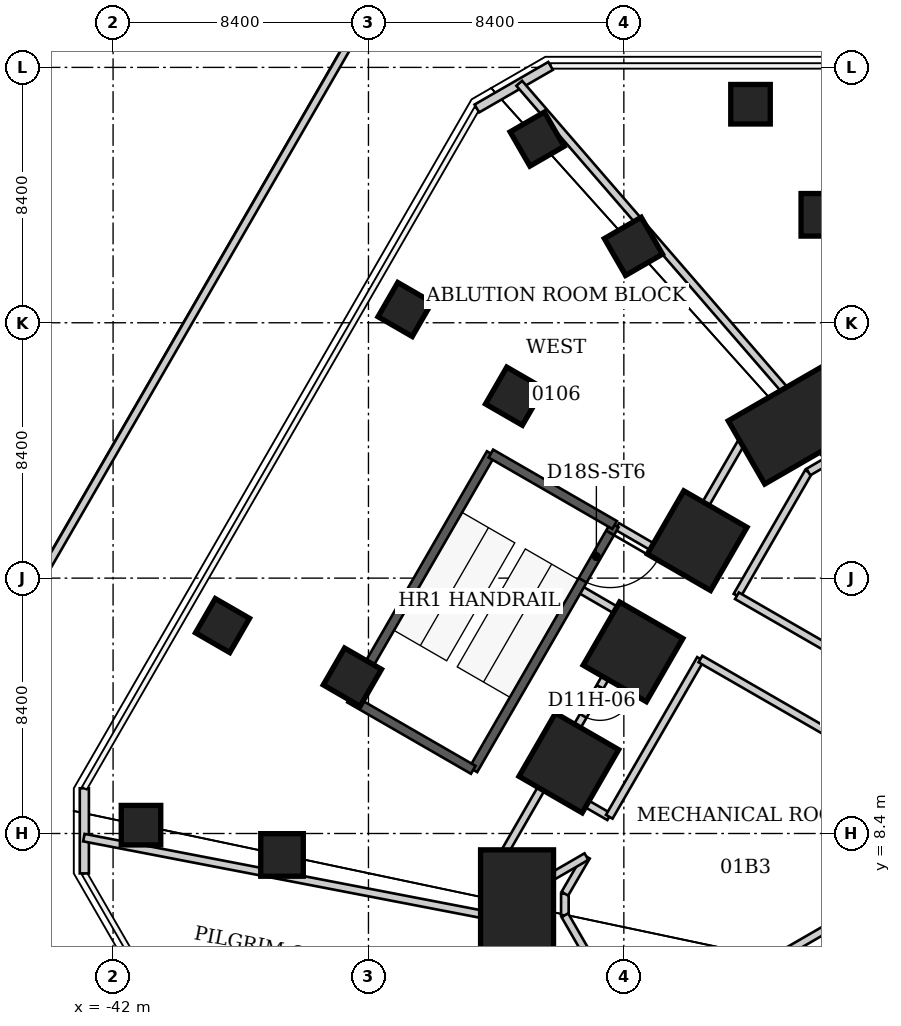
"""IFC4 building model, lengths in metres.
Left out: names, types, materials, properties, quantities, classifications, styles, units other than length and angle.
Written with IfcOpenShell. Run it as: python <this file> out.ifc"""

import sys

from ifc_helpers import new_model, si_unit, direction, frame, frame_2d, origin, origin_2d, place, context, subcontext, project, spatial, rectangle, extrude, element, fill, save


model = new_model("IFC4")
c1 = context("Model", 3, precision=1e-05, world=origin(), true_north=direction((0.0, 1.0)))
c2 = subcontext(c1, "Body", "Model", "MODEL_VIEW")
j1 = project(units=[si_unit("LENGTHUNIT", "METRE"), si_unit("PLANEANGLEUNIT", "RADIAN")], contexts=[c1])
p1 = place(None, origin())
s1 = spatial("IfcSite", under=j1, at=p1, CompositionType="ELEMENT")
p2 = place(p1, origin())
s2 = spatial("IfcBuilding", under=s1, at=p2, CompositionType="ELEMENT")
p3 = place(p2, frame((0.0, 0.0, 6.0)))
s3 = spatial("IfcBuildingStorey", under=s2, at=p3, CompositionType="ELEMENT", Elevation=6.0)
p4 = place(p3, frame((-28.713, 6.062, 0.0), z_axis=(0.0, 0.0, 1.0), x_axis=(-1.0, 0.0, 0.0)))
e1 = element("IfcColumn", 1, at=p4, inside=s3, PredefinedType="COLUMN", context=c2, shape_type="SweptSolid", body=[
    extrude(rectangle(XDim=2.4, YDim=3.6, at=origin_2d()), origin(), (0.0, 0.0, 1.0), 6.0),
])
for number, where, z_axis, x_axis in (
    (2, (-27.01, 10.719, 0.0), (0.0, 0.0, 1.0), (-0.866, 0.5, 0.0)),
    (3, (-24.899, 14.375, 0.0), (0.0, 0.0, 1.0), (-0.866, 0.5, 0.0)),
    (4, (-22.788, 18.032, 0.0), (0.0, 0.0, 1.0), (-0.866, 0.5, 0.0)),
):
    element("IfcColumn", number, at=place(p3, frame(where, z_axis=z_axis, x_axis=x_axis)), inside=s3, PredefinedType="COLUMN", context=c2, shape_type="SweptSolid", body=[
        extrude(rectangle(XDim=2.4, YDim=2.4, at=origin_2d()), origin(), (0.0, 0.0, 1.0), 6.0),
    ])
p5 = place(p3, frame((-19.606, 21.835, 0.0), z_axis=(0.0, 0.0, 1.0), x_axis=(-0.5, 0.866025403784, 0.0)))
e5 = element("IfcColumn", 5, at=p5, inside=s3, PredefinedType="COLUMN", context=c2, shape_type="SweptSolid", body=[
    extrude(rectangle(XDim=2.4, YDim=3.6, at=origin_2d()), origin(), (0.0, 0.0, 1.0), 6.0),
])
for number, where, z_axis, x_axis in (
    (6, (-18.672, 28.751, 0.0), (0.0, 0.0, 1.0), (0.0, 1.0, 0.0)),
    (7, (-36.443, 7.694, 0.0), (0.0, 0.0, 1.0), (-1.0, 0.0, 0.0)),
    (8, (-34.129, 13.544, 0.0), (0.0, 0.0, 1.0), (-0.866, 0.5, 0.0)),
    (9, (-28.794, 22.785, 0.0), (0.0, 0.0, 1.0), (-0.866, 0.5, 0.0)),
    (10, (-24.885, 27.714, 0.0), (0.0, 0.0, 1.0), (-0.5, 0.866, 0.0)),
):
    element("IfcColumn", number, at=place(p3, frame(where, z_axis=z_axis, x_axis=x_axis)), inside=s3, PredefinedType="COLUMN", context=c2, shape_type="SweptSolid", body=[
        extrude(rectangle(XDim=1.4, YDim=1.4, at=origin_2d()), origin(), (0.0, 0.0, 1.0), 6.0),
    ])
for number, where, z_axis, x_axis in (
    (11, (-21.034, 32.388, 0.0), (0.0, 0.0, 1.0), (0.0, 1.0, 0.0)),
    (12, (-41.082, 8.674, 0.0), (0.0, 0.0, 1.0), (-1.0, 0.0, 0.0)),
    (13, (-38.4, 15.239, 0.0), (0.0, 0.0, 1.0), (-0.866, 0.5, 0.0)),
    (14, (-32.397, 25.636, 0.0), (0.0, 0.0, 1.0), (-0.866, 0.5, 0.0)),
    (15, (-28.052, 31.241, 0.0), (0.0, 0.0, 1.0), (-0.5, 0.866, 0.0)),
):
    element("IfcColumn", number, at=place(p3, frame(where, z_axis=z_axis, x_axis=x_axis)), inside=s3, PredefinedType="COLUMN", context=c2, shape_type="SweptSolid", body=[
        extrude(rectangle(XDim=1.3, YDim=1.3, at=origin_2d()), origin(), (0.0, 0.0, 1.0), 6.0),
    ])
p6 = place(p3, frame((-42.945, 7.087, 0.0), z_axis=(0.0, 0.0, 1.0), x_axis=(0.0, 1.0, 0.0)))
e16 = element("IfcWall", 16, at=p6, inside=s3, PredefinedType="SOLIDWALL", context=c2, shape_type="SweptSolid", body=[
    extrude(rectangle(XDim=2.8, YDim=0.3, at=frame_2d((1.4, 0.0))), origin(), (0.0, 0.0, 1.0), 5.84),
])
p7 = place(p3, frame((-30.035, 32.248, 0.0), z_axis=(0.0, 0.0, 1.0), x_axis=(0.866056369097, 0.49994636267, 0.0)))
e17 = element("IfcWall", 17, at=p7, inside=s3, PredefinedType="SOLIDWALL", context=c2, shape_type="SweptSolid", body=[
    extrude(rectangle(XDim=2.8, YDim=0.3, at=frame_2d((1.4, 0.0))), origin(), (0.0, 0.0, 1.0), 5.84),
])
p8 = place(p3, frame((-33.343, 35.926, 0.0), z_axis=(0.0, 0.0, 1.0), x_axis=(-0.500005626994, -0.866022155013, 0.0)))
e18 = element("IfcWall", 18, at=p8, inside=s3, PredefinedType="PARAPET", context=c2, shape_type="SweptSolid", body=[
    extrude(rectangle(XDim=28.882, YDim=0.25, at=frame_2d((14.441, 0.0))), origin(), (0.0, 0.0, 1.0), 1.1),
])
p9 = place(p3, frame((-47.782, 7.822, 0.0), z_axis=(0.0, 0.0, 1.0), x_axis=(0.499999154746, -0.866025891791, 0.0)))
e19 = element("IfcWall", 19, at=p9, inside=s3, PredefinedType="PARAPET", context=c2, shape_type="SweptSolid", body=[
    extrude(rectangle(XDim=61.33, YDim=0.25, at=frame_2d((30.665, 0.0))), origin(), (0.0, 0.0, 1.0), 1.1),
])
p10 = place(p3, frame((-29.54, 5.06, 0.0), z_axis=(0.0, 0.0, 1.0), x_axis=(0.499846097802, -0.866114241029, 0.0)))
e20 = element("IfcWall", 20, at=p10, inside=s3, PredefinedType="PARTITIONING", context=c2, shape_type="SweptSolid", body=[
    extrude(rectangle(XDim=5.242, YDim=0.25, at=frame_2d((2.621, 0.0))), origin(), (0.0, 0.0, 1.0), 4.04),
])
p11 = place(p10, frame((1.971, 0.0, 0.0)))
e21 = element("IfcOpeningElement", 21, at=p11, cuts=e20, PredefinedType="OPENING", context=c2, shape_type="SweptSolid", body=[
    extrude(rectangle(XDim=1.1, YDim=2.2, at=frame_2d((0.55, 1.1))), frame((0.0, 0.125, 0.0), z_axis=(0.0, -1.0, 0.0), x_axis=(1.0, 0.0, 0.0)), (0.0, 0.0, 1.0), 0.25),
])
p12 = place(p3, frame((-29.54, 5.645, 0.0), z_axis=(0.0, 0.0, 1.0), x_axis=(0.0, -1.0, 0.0)))
e22 = element("IfcWall", 22, at=p12, inside=s3, PredefinedType="PARTITIONING", context=c2, shape_type="SweptSolid", body=[
    extrude(rectangle(XDim=0.585, YDim=0.25, at=frame_2d((0.292, 0.0))), origin(), (0.0, 0.0, 1.0), 5.84),
])
p13 = place(p3, frame((-29.54, 5.68, 0.0), z_axis=(0.0, 0.0, 1.0), x_axis=(-0.981957231685, 0.189103133611, 0.0)))
e23 = element("IfcWall", 23, at=p13, inside=s3, PredefinedType="PARTITIONING", context=c2, shape_type="SweptSolid", body=[
    extrude(rectangle(XDim=13.667, YDim=0.25, at=frame_2d((6.833, 0.0))), origin(), (0.0, 0.0, 1.0), 5.75),
])
p14 = place(p3, frame((-29.54, 7.06, 0.0), z_axis=(0.0, 0.0, 1.0), x_axis=(0.0, -1.0, 0.0)))
e24 = element("IfcWall", 24, at=p14, inside=s3, PredefinedType="PARTITIONING", context=c2, shape_type="SweptSolid", body=[
    extrude(rectangle(XDim=1.22, YDim=0.25, at=frame_2d((0.61, 0.0))), origin(), (0.0, 0.0, 1.0), 5.84),
])
p15 = place(p3, frame((-27.76, 10.15, 0.0), z_axis=(0.0, 0.0, 1.0), x_axis=(-0.499181015942, -0.8664977284, 0.0)))
e25 = element("IfcWall", 25, at=p15, inside=s3, PredefinedType="PARTITIONING", context=c2, shape_type="SweptSolid", body=[
    extrude(rectangle(XDim=3.566, YDim=0.25, at=frame_2d((1.783, 0.0))), origin(), (0.0, 0.0, 1.0), 5.84),
])
p16 = place(p3, frame((-27.76, 10.15, 0.0), z_axis=(0.0, 0.0, 1.0), x_axis=(0.866202511239, -0.499693115345, 0.0)))
e26 = element("IfcWall", 26, at=p16, inside=s3, PredefinedType="PARTITIONING", context=c2, shape_type="SweptSolid", body=[
    extrude(rectangle(XDim=2.401, YDim=0.25, at=frame_2d((1.201, 0.0))), origin(), (0.0, 0.0, 1.0), 5.84),
])
p17 = place(p3, frame((-27.14, 5.71, 0.0), z_axis=(0.0, 0.0, 1.0), x_axis=(0.0, 1.0, 0.0)))
e27 = element("IfcWall", 27, at=p17, inside=s3, PredefinedType="PARTITIONING", context=c2, shape_type="SweptSolid", body=[
    extrude(rectangle(XDim=0.71, YDim=0.25, at=frame_2d((0.355, 0.0))), origin(), (0.0, 0.0, 1.0), 5.84),
])
p18 = place(p3, frame((-27.14, 6.42, 0.0), z_axis=(0.0, 0.0, 1.0), x_axis=(0.502902974743, 0.864342870622, 0.0)))
e28 = element("IfcWall", 28, at=p18, inside=s3, PredefinedType="PARTITIONING", context=c2, shape_type="SweptSolid", body=[
    extrude(rectangle(XDim=1.412, YDim=0.25, at=frame_2d((0.706, 0.0))), origin(), (0.0, 0.0, 1.0), 5.84),
])
p19 = place(p3, frame((-26.62, 16.42, 0.0), z_axis=(0.0, 0.0, 1.0), x_axis=(0.864835053767, -0.50205610222, 0.0)))
e29 = element("IfcWall", 29, at=p19, inside=s3, PredefinedType="PARTITIONING", context=c2, shape_type="SweptSolid", body=[
    extrude(rectangle(XDim=2.151, YDim=0.25, at=frame_2d((1.075, 0.0))), origin(), (0.0, 0.0, 1.0), 5.84),
])
p20 = place(p3, frame((-26.43, 7.64, 0.0), z_axis=(0.0, 0.0, 1.0), x_axis=(-0.865520854062, -0.500872889249, 0.0)))
e30 = element("IfcWall", 30, at=p20, inside=s3, PredefinedType="PARTITIONING", context=c2, shape_type="SweptSolid", body=[
    extrude(rectangle(XDim=3.593, YDim=0.25, at=frame_2d((1.797, 0.0))), origin(), (0.0, 0.0, 1.0), 5.84),
])
p21 = place(p3, frame((-25.68, 8.95, 0.0), z_axis=(0.0, 0.0, 1.0), x_axis=(0.50043093139, 0.865776462436, 0.0)))
e31 = element("IfcWall", 31, at=p21, inside=s3, PredefinedType="PARTITIONING", context=c2, shape_type="SweptSolid", body=[
    extrude(rectangle(XDim=5.995, YDim=0.25, at=frame_2d((2.998, 0.0))), origin(), (0.0, 0.0, 1.0), 5.84),
])
p22 = place(p3, frame((-24.8, 1.65, 0.0), z_axis=(0.0, 0.0, 1.0), x_axis=(-0.499361596599, 0.866393672555, 0.0)))
e32 = element("IfcWall", 32, at=p22, inside=s3, PredefinedType="PARTITIONING", context=c2, shape_type="SweptSolid", body=[
    extrude(rectangle(XDim=4.686, YDim=0.25, at=frame_2d((2.343, 0.0))), origin(), (0.0, 0.0, 1.0), 5.84),
])
p23 = place(p3, frame((-24.76, 15.34, 0.0), z_axis=(0.0, 0.0, 1.0), x_axis=(-0.50043093139, -0.865776462436, 0.0)))
e33 = element("IfcWall", 33, at=p23, inside=s3, PredefinedType="PARTITIONING", context=c2, shape_type="SweptSolid", body=[
    extrude(rectangle(XDim=5.995, YDim=0.25, at=frame_2d((2.998, 0.0))), origin(), (0.0, 0.0, 1.0), 4.04),
])
p24 = place(p23, frame((2.448, 0.0, 0.0)))
e34 = element("IfcOpeningElement", 34, at=p24, cuts=e33, PredefinedType="OPENING", context=c2, shape_type="SweptSolid", body=[
    extrude(rectangle(XDim=1.1, YDim=2.2, at=frame_2d((0.55, 1.1))), frame((0.0, 0.125, 0.0), z_axis=(0.0, -1.0, 0.0), x_axis=(1.0, 0.0, 0.0)), (0.0, 0.0, 1.0), 0.25),
])
p25 = place(p3, frame((-23.56, 17.42, 0.0), z_axis=(0.0, 0.0, 1.0), x_axis=(-0.864757143013, 0.502190286255, 0.0)))
e35 = element("IfcWall", 35, at=p25, inside=s3, PredefinedType="PARTITIONING", context=c2, shape_type="SweptSolid", body=[
    extrude(rectangle(XDim=2.151, YDim=0.25, at=frame_2d((1.075, 0.0))), origin(), (0.0, 0.0, 1.0), 5.84),
])
p26 = place(p3, frame((-22.68, 14.14, 0.0), z_axis=(0.0, 0.0, 1.0), x_axis=(0.866256251028, -0.499599947513, 0.0)))
e36 = element("IfcWall", 36, at=p26, inside=s3, PredefinedType="PARTITIONING", context=c2, shape_type="SweptSolid", body=[
    extrude(rectangle(XDim=12.71, YDim=0.25, at=frame_2d((6.355, 0.0))), origin(), (0.0, 0.0, 1.0), 5.84),
])
p27 = place(p26, frame((5.805, 0.0, 0.0)))
e37 = element("IfcOpeningElement", 37, at=p27, cuts=e36, PredefinedType="OPENING", context=c2, shape_type="SweptSolid", body=[
    extrude(rectangle(XDim=1.1, YDim=2.2, at=frame_2d((0.55, 1.1))), frame((0.0, 0.125, 0.0), z_axis=(0.0, -1.0, 0.0), x_axis=(1.0, 0.0, 0.0)), (0.0, 0.0, 1.0), 0.25),
])
p28 = place(p3, frame((-21.48, 16.22, 0.0), z_axis=(0.0, 0.0, 1.0), x_axis=(0.499999753078, 0.866025546345, 0.0)))
e38 = element("IfcWall", 38, at=p28, inside=s3, PredefinedType="PARTITIONING", context=c2, shape_type="SweptSolid", body=[
    extrude(rectangle(XDim=4.7, YDim=0.25, at=frame_2d((2.35, 0.0))), origin(), (0.0, 0.0, 1.0), 5.84),
])
p29 = place(p3, frame((-20.88, 22.05, 0.0), z_axis=(0.0, 0.0, 1.0), x_axis=(-0.50097690648, -0.86546065143, 0.0)))
e39 = element("IfcWall", 39, at=p29, inside=s3, PredefinedType="PARTITIONING", context=c2, shape_type="SweptSolid", body=[
    extrude(rectangle(XDim=5.35, YDim=0.25, at=frame_2d((2.675, 0.0))), origin(), (0.0, 0.0, 1.0), 4.04),
])
p30 = place(p3, frame((-20.23, 22.43, 0.0), z_axis=(0.0, 0.0, 1.0), x_axis=(-0.863331575042, -0.504637088942, 0.0)))
e40 = element("IfcWall", 40, at=p30, inside=s3, PredefinedType="PARTITIONING", context=c2, shape_type="SweptSolid", body=[
    extrude(rectangle(XDim=0.753, YDim=0.25, at=frame_2d((0.376, 0.0))), origin(), (0.0, 0.0, 1.0), 5.84),
])
p31 = place(p3, frame((-19.746, 22.708, 0.0), z_axis=(0.0, 0.0, 1.0), x_axis=(-0.867257505244, -0.49785983931, 0.0)))
e41 = element("IfcWall", 41, at=p31, inside=s3, PredefinedType="PARTITIONING", context=c2, shape_type="SweptSolid", body=[
    extrude(rectangle(XDim=0.443, YDim=0.25, at=frame_2d((0.221, 0.0))), origin(), (0.0, 0.0, 1.0), 5.84),
])
p32 = place(p3, frame((-19.69, 22.74, 0.0), z_axis=(0.0, 0.0, 1.0), x_axis=(-0.654569518712, 0.756001815589, 0.0)))
e42 = element("IfcWall", 42, at=p32, inside=s3, PredefinedType="PARTITIONING", context=c2, shape_type="SweptSolid", body=[
    extrude(rectangle(XDim=13.674, YDim=0.25, at=frame_2d((6.837, 0.0))), origin(), (0.0, 0.0, 1.0), 5.75),
])
p33 = place(p3, frame((-19.15, 23.05, 0.0), z_axis=(0.0, 0.0, 1.0), x_axis=(-0.867193315, -0.497971640175, 0.0)))
e43 = element("IfcWall", 43, at=p33, inside=s3, PredefinedType="PARTITIONING", context=c2, shape_type="SweptSolid", body=[
    extrude(rectangle(XDim=0.588, YDim=0.25, at=frame_2d((0.294, 0.0))), origin(), (0.0, 0.0, 1.0), 5.84),
])
p34 = place(p3, frame((-19.13, 20.29, 0.0), z_axis=(0.0, 0.0, 1.0), x_axis=(0.864827114446, 0.502069778138, 0.0)))
e44 = element("IfcWall", 44, at=p34, inside=s3, PredefinedType="PARTITIONING", context=c2, shape_type="SweptSolid", body=[
    extrude(rectangle(XDim=0.717, YDim=0.25, at=frame_2d((0.358, 0.0))), origin(), (0.0, 0.0, 1.0), 5.84),
])
p35 = place(p3, frame((-17.14, 20.65, 0.0), z_axis=(0.0, 0.0, 1.0), x_axis=(-0.866514787199, 0.49915140345, 0.0)))
e45 = element("IfcWall", 45, at=p35, inside=s3, PredefinedType="PARTITIONING", context=c2, shape_type="SweptSolid", body=[
    extrude(rectangle(XDim=3.566, YDim=0.25, at=frame_2d((1.783, 0.0))), origin(), (0.0, 0.0, 1.0), 5.84),
])
p36 = place(p3, frame((-14.46, 7.62, 0.0), z_axis=(0.0, 0.0, 1.0), x_axis=(-0.866012263686, -0.500022758628, 0.0)))
e46 = element("IfcWall", 46, at=p36, inside=s3, PredefinedType="PARTITIONING", context=c2, shape_type="SweptSolid", body=[
    extrude(rectangle(XDim=11.94, YDim=0.25, at=frame_2d((5.97, 0.0))), origin(), (0.0, 0.0, 1.0), 5.84),
])
p37 = place(p3, frame((-10.73, 10.02, 0.0), z_axis=(0.0, 0.0, 1.0), x_axis=(-0.866254357941, 0.499603229922, 0.0)))
e47 = element("IfcWall", 47, at=p37, inside=s3, PredefinedType="PARTITIONING", context=c2, shape_type="SweptSolid", body=[
    extrude(rectangle(XDim=12.41, YDim=0.25, at=frame_2d((6.205, 0.0))), origin(), (0.0, 0.0, 1.0), 5.84),
])
p38 = place(p37, frame((5.405, 0.0, 0.0)))
e48 = element("IfcOpeningElement", 48, at=p38, cuts=e47, PredefinedType="OPENING", context=c2, shape_type="SweptSolid", body=[
    extrude(rectangle(XDim=1.6, YDim=2.4, at=frame_2d((0.8, 1.2))), frame((0.0, 0.125, 0.0), z_axis=(0.0, -1.0, 0.0), x_axis=(1.0, 0.0, 0.0)), (0.0, 0.0, 1.0), 0.25),
])
p39 = place(p3, frame((-4.0, 23.05, 0.0), z_axis=(0.0, 0.0, 1.0), x_axis=(-1.0, 0.0, 0.0)))
e49 = element("IfcWall", 49, at=p39, inside=s3, PredefinedType="PARTITIONING", context=c2, shape_type="SweptSolid", body=[
    extrude(rectangle(XDim=15.15, YDim=0.25, at=frame_2d((7.575, 0.0))), origin(), (0.0, 0.0, 1.0), 4.04),
])
p40 = place(p39, frame((7.825, 0.0, 0.0)))
e50 = element("IfcOpeningElement", 50, at=p40, cuts=e49, PredefinedType="OPENING", context=c2, shape_type="SweptSolid", body=[
    extrude(rectangle(XDim=1.6, YDim=2.4, at=frame_2d((0.8, 1.2))), frame((0.0, 0.125, 0.0), z_axis=(0.0, -1.0, 0.0), x_axis=(1.0, 0.0, 0.0)), (0.0, 0.0, 1.0), 0.25),
])
p41 = place(p3, frame((-25.504, 18.548, 0.0), z_axis=(0.0, 0.0, 1.0), x_axis=(-0.500004225487, -0.866022964185, 0.0)))
e51 = element("IfcWall", 51, at=p41, inside=s3, PredefinedType="SHEAR", context=c2, shape_type="SweptSolid", body=[
    extrude(rectangle(XDim=9.3, YDim=0.3, at=frame_2d((4.65, 0.0))), origin(), (0.0, 0.0, 1.0), 6.0),
])
p42 = place(p41, frame((0.3, 0.0, 0.0)))
e52 = element("IfcOpeningElement", 52, at=p42, cuts=e51, PredefinedType="OPENING", context=c2, shape_type="SweptSolid", body=[
    extrude(rectangle(XDim=1.8, YDim=2.4, at=frame_2d((0.9, 1.2))), frame((0.0, 0.15, 0.0), z_axis=(0.0, -1.0, 0.0), x_axis=(1.0, 0.0, 0.0)), (0.0, 0.0, 1.0), 0.3),
])
p43 = place(p3, frame((-30.154, 10.494, 0.0), z_axis=(0.0, 0.0, 1.0), x_axis=(-0.866016039709, 0.500016218704, 0.0)))
e53 = element("IfcWall", 53, at=p43, inside=s3, PredefinedType="SHEAR", context=c2, shape_type="SweptSolid", body=[
    extrude(rectangle(XDim=4.7, YDim=0.3, at=frame_2d((2.35, 0.0))), origin(), (0.0, 0.0, 1.0), 6.0),
])
p44 = place(p3, frame((-34.224, 12.844, 0.0), z_axis=(0.0, 0.0, 1.0), x_axis=(0.500015592816, 0.866016401081, 0.0)))
e54 = element("IfcWall", 54, at=p44, inside=s3, PredefinedType="SHEAR", context=c2, shape_type="SweptSolid", body=[
    extrude(rectangle(XDim=9.3, YDim=0.3, at=frame_2d((4.65, 0.0))), origin(), (0.0, 0.0, 1.0), 6.0),
])
p45 = place(p3, frame((-29.574, 20.898, 0.0), z_axis=(0.0, 0.0, 1.0), x_axis=(0.866038532462, -0.499977259774, 0.0)))
e55 = element("IfcWall", 55, at=p45, inside=s3, PredefinedType="SHEAR", context=c2, shape_type="SweptSolid", body=[
    extrude(rectangle(XDim=4.7, YDim=0.3, at=frame_2d((2.35, 0.0))), origin(), (0.0, 0.0, 1.0), 6.0),
])
p46 = place(p24, origin())
e56 = element("IfcDoor", 56, at=p46, inside=s3, OperationType="SINGLE_SWING_LEFT", PredefinedType="DOOR", context=c2, shape_type="SweptSolid", body=[
    extrude(rectangle(XDim=1.1, YDim=2.2, at=frame_2d((0.55, 1.1))), frame((0.0, 0.025, 0.0), z_axis=(0.0, -1.0, 0.0), x_axis=(1.0, 0.0, 0.0)), (0.0, 0.0, 1.0), 0.05),
])
fill(e34, e56)
p47 = place(p42, origin())
e57 = element("IfcDoor", 57, at=p47, inside=s3, OperationType="DOUBLE_DOOR_SINGLE_SWING", PredefinedType="DOOR", context=c2, shape_type="SweptSolid", body=[
    extrude(rectangle(XDim=1.8, YDim=2.4, at=frame_2d((0.9, 1.2))), frame((0.0, 0.025, 0.0), z_axis=(0.0, -1.0, 0.0), x_axis=(1.0, 0.0, 0.0)), (0.0, 0.0, 1.0), 0.05),
])
fill(e52, e57)
save(model, sys.argv[1])
